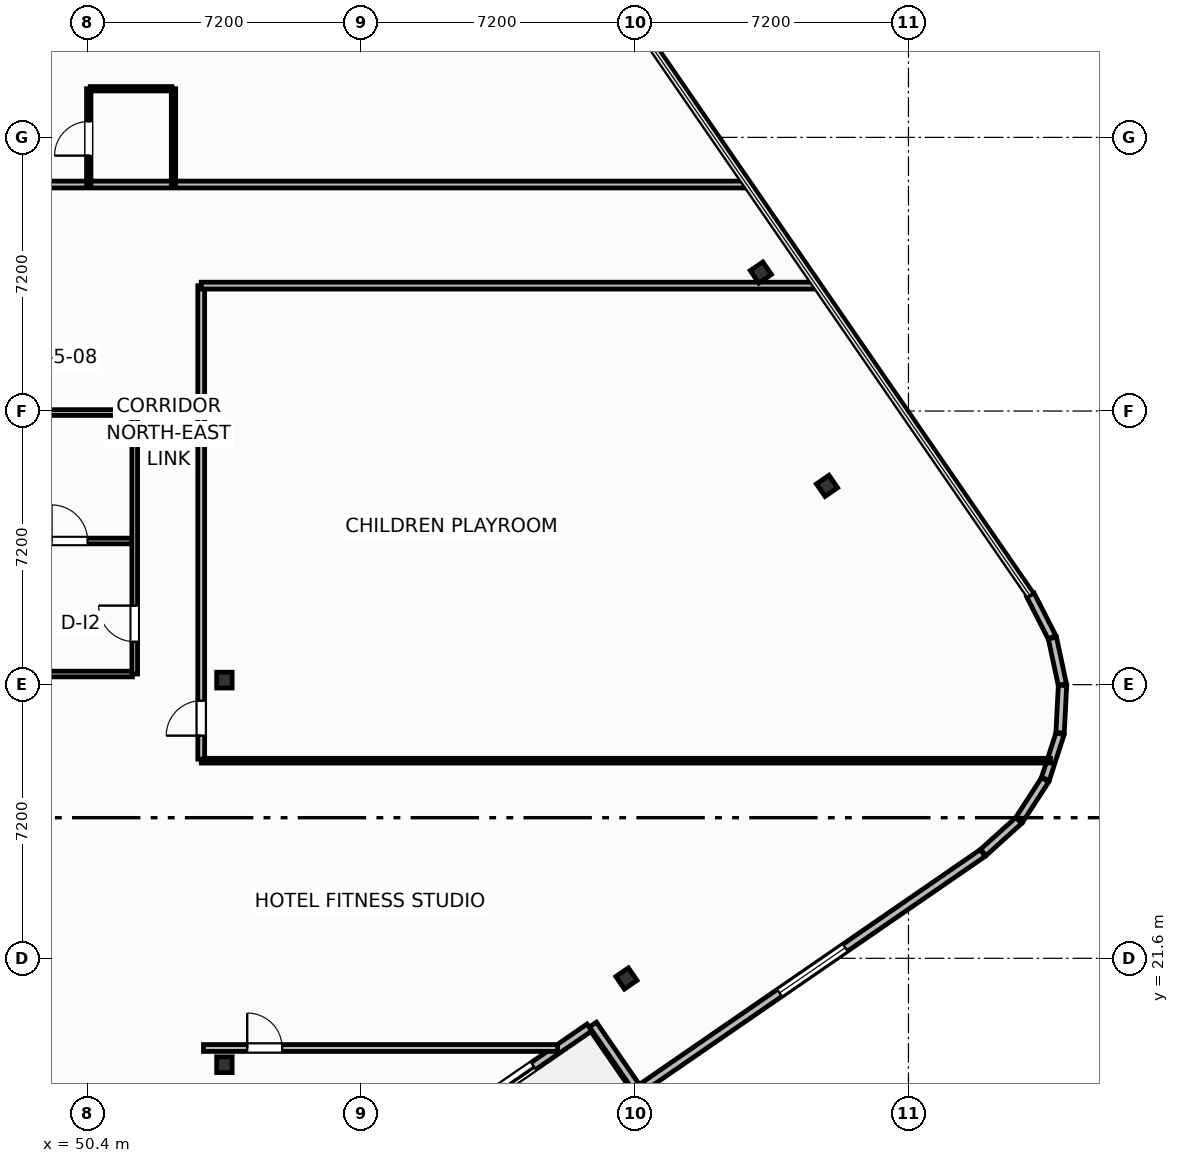
"""IFC4 building model, lengths in metres.
Left out: names, types, materials, properties, quantities, classifications, styles, units other than length and angle.
Written with IfcOpenShell. Run it as: python <this file> out.ifc"""

import sys

from ifc_helpers import new_model, si_unit, direction, frame, frame_2d, origin, origin_2d, place, context, subcontext, project, spatial, rectangle, i_section, extrude, element, fill, save


model = new_model("IFC4")
c1 = context("Model", 3, precision=1e-05, world=origin(), true_north=direction((0.0, 1.0)))
c2 = subcontext(c1, "Body", "Model", "MODEL_VIEW")
j1 = project(units=[si_unit("LENGTHUNIT", "METRE"), si_unit("PLANEANGLEUNIT", "RADIAN")], contexts=[c1])
p1 = place(None, origin())
s1 = spatial("IfcSite", under=j1, at=p1, CompositionType="ELEMENT")
p2 = place(p1, origin())
s2 = spatial("IfcBuilding", under=s1, at=p2, CompositionType="ELEMENT")
p3 = place(p2, frame((0.0, 0.0, 269.3)))
s3 = spatial("IfcBuildingStorey", under=s2, at=p3, CompositionType="ELEMENT", Elevation=269.3)
for number, where, z_axis, x_axis in (
    (1, (54.0, 18.8, 0.0), (0.0, 0.0, 1.0), (1.0, 0.0, 0.0)),
    (2, (54.0, 28.92, 0.0), (0.0, 0.0, 1.0), (1.0, 0.0, 0.0)),
):
    element("IfcColumn", number, at=place(p3, frame(where, z_axis=z_axis, x_axis=x_axis)), inside=s3, PredefinedType="COLUMN", context=c2, shape_type="SweptSolid", body=[
        extrude(i_section(OverallWidth=0.406, OverallDepth=0.416, WebThickness=0.03, FlangeThickness=0.048, FilletRadius=0.025, at=origin_2d()), origin(), (0.0, 0.0, 1.0), 3.7),
    ])
for number, where, z_axis, x_axis in (
    (3, (64.578, 21.07, 0.0), (0.0, 0.0, 1.0), (0.824, 0.567, 0.0)),
    (4, (69.857, 34.031, 0.0), (0.0, 0.0, 1.0), (0.824, 0.567, 0.0)),
    (5, (68.115, 39.644, 0.0), (0.0, 0.0, 1.0), (0.824, 0.567, 0.0)),
):
    element("IfcColumn", number, at=place(p3, frame(where, z_axis=z_axis, x_axis=x_axis)), inside=s3, PredefinedType="COLUMN", context=c2, shape_type="SweptSolid", body=[
        extrude(i_section(OverallWidth=0.401, OverallDepth=0.399, WebThickness=0.025, FlangeThickness=0.04, FilletRadius=0.022, at=origin_2d()), origin(), (0.0, 0.0, 1.0), 3.7),
    ])
p4 = place(p3, frame((63.605, 19.78, 0.0), z_axis=(0.0, 0.0, 1.0), x_axis=(-0.823541290762, -0.567256328665, 0.0)))
e6 = element("IfcWall", 6, at=p4, inside=s3, PredefinedType="SOLIDWALL", context=c2, shape_type="SweptSolid", body=[
    extrude(rectangle(XDim=5.567, YDim=0.22, at=frame_2d((2.784, 0.0))), origin(), (0.0, 0.0, 1.0), 2.73),
])
p5 = place(p4, frame((1.787, 0.0, 0.0)))
e7 = element("IfcOpeningElement", 7, at=p5, cuts=e6, PredefinedType="OPENING", context=c2, shape_type="SweptSolid", body=[
    extrude(rectangle(XDim=2.1, YDim=2.3, at=frame_2d((1.05, 1.15))), frame((0.0, 0.12, 0.0), z_axis=(0.0, -1.0, 0.0), x_axis=(1.0, 0.0, 0.0)), (0.0, 0.0, 1.0), 0.24),
])
p6 = place(p3, frame((63.698, 19.856, 0.0), z_axis=(0.0, 0.0, 1.0), x_axis=(0.567219383419, -0.823566737474, 0.0)))
e8 = element("IfcWall", 8, at=p6, inside=s3, PredefinedType="SOLIDWALL", context=c2, shape_type="SweptSolid", body=[
    extrude(rectangle(XDim=2.1, YDim=0.22, at=frame_2d((1.05, 0.0))), origin(), (0.0, 0.0, 1.0), 2.73),
])
p7 = place(p3, frame((64.992, 18.198, 0.0), z_axis=(0.0, 0.0, 1.0), x_axis=(0.823538117322, 0.56726093583, 0.0)))
e9 = element("IfcWall", 9, at=p7, inside=s3, PredefinedType="SOLIDWALL", context=c2, shape_type="SweptSolid", body=[
    extrude(rectangle(XDim=10.88, YDim=0.22, at=frame_2d((5.44, 0.0))), origin(), (0.0, 0.0, 1.0), 2.73),
])
p8 = place(p7, frame((4.39, 0.0, 0.8)))
e10 = element("IfcOpeningElement", 10, at=p8, cuts=e9, PredefinedType="OPENING", context=c2, shape_type="SweptSolid", body=[
    extrude(rectangle(XDim=2.1, YDim=1.75, at=frame_2d((1.05, 0.875))), frame((0.0, 0.12, 0.0), z_axis=(0.0, -1.0, 0.0), x_axis=(1.0, 0.0, 0.0)), (0.0, 0.0, 1.0), 0.24),
])
p9 = place(p3, frame((73.971, 24.387, 0.0), z_axis=(0.0, 0.0, 1.0), x_axis=(0.742501517089, 0.669844382764, 0.0)))
e11 = element("IfcWall", 11, at=p9, inside=s3, PredefinedType="SOLIDWALL", context=c2, shape_type="SweptSolid", body=[
    extrude(rectangle(XDim=1.257, YDim=0.22, at=frame_2d((0.628, 0.0))), origin(), (0.0, 0.0, 1.0), 2.73),
])
p10 = place(p3, frame((74.917, 25.25, 0.0), z_axis=(0.0, 0.0, 1.0), x_axis=(0.543778157277, 0.839229000731, 0.0)))
e12 = element("IfcWall", 12, at=p10, inside=s3, PredefinedType="SOLIDWALL", context=c2, shape_type="SweptSolid", body=[
    extrude(rectangle(XDim=1.249, YDim=0.22, at=frame_2d((0.624, 0.0))), origin(), (0.0, 0.0, 1.0), 2.73),
])
for number, where, z_axis, x_axis in (
    (13, (75.604, 26.321, 0.0), (0.0, 0.0, 1.0), (0.308, 0.951, 0.0)),
    (14, (75.99, 27.534, 0.0), (0.0, 0.0, 1.0), (0.051, 0.999, 0.0)),
    (15, (76.049, 28.805, 0.0), (0.0, 0.0, 1.0), (-0.209, 0.978, 0.0)),
    (16, (75.777, 30.049, 0.0), (0.0, 0.0, 1.0), (-0.455, 0.891, 0.0)),
):
    element("IfcWall", number, at=place(p3, frame(where, z_axis=z_axis, x_axis=x_axis)), inside=s3, PredefinedType="SOLIDWALL", context=c2, shape_type="SweptSolid", body=[
        extrude(rectangle(XDim=1.249, YDim=0.22, at=frame_2d((0.625, 0.0))), origin(), (0.0, 0.0, 1.0), 2.73),
    ])
p11 = place(p3, frame((46.08, 41.96, 0.0), z_axis=(0.0, 0.0, 1.0), x_axis=(1.0, 0.0, 0.0)))
e17 = element("IfcWall", 17, at=p11, inside=s3, PredefinedType="PARTITIONING", context=c2, shape_type="SweptSolid", body=[
    extrude(rectangle(XDim=21.627, YDim=0.18, at=frame_2d((10.813, 0.0))), origin(), (0.0, 0.0, 1.0), 3.45),
])
p12 = place(p11, frame((0.921, 0.0, 0.0)))
e18 = element("IfcOpeningElement", 18, at=p12, cuts=e17, PredefinedType="OPENING", context=c2, shape_type="SweptSolid", body=[
    extrude(rectangle(XDim=0.95, YDim=2.15, at=frame_2d((0.475, 1.075))), frame((0.0, 0.1, 0.0), z_axis=(0.0, -1.0, 0.0), x_axis=(1.0, 0.0, 0.0)), (0.0, 0.0, 1.0), 0.2),
])
p13 = place(p3, frame((50.47, 44.48, 0.0), z_axis=(0.0, 0.0, 1.0), x_axis=(1.0, 0.0, 0.0)))
e19 = element("IfcWall", 19, at=p13, inside=s3, PredefinedType="PARTITIONING", context=c2, shape_type="SweptSolid", body=[
    extrude(rectangle(XDim=2.15, YDim=0.115, at=frame_2d((1.075, 0.0))), origin(), (0.0, 0.0, 1.0), 3.018),
])
p14 = place(p3, frame((50.43, 41.96, 0.0), z_axis=(0.0, 0.0, 1.0), x_axis=(0.0, 1.0, 0.0)))
e20 = element("IfcWall", 20, at=p14, inside=s3, PredefinedType="PARTITIONING", context=c2, shape_type="SweptSolid", body=[
    extrude(rectangle(XDim=2.52, YDim=0.115, at=frame_2d((1.26, 0.0))), origin(), (0.0, 0.0, 1.0), 3.45),
])
p15 = place(p14, frame((0.76, 0.0, 0.0)))
e21 = element("IfcOpeningElement", 21, at=p15, cuts=e20, PredefinedType="OPENING", context=c2, shape_type="SweptSolid", body=[
    extrude(rectangle(XDim=0.9, YDim=2.05, at=frame_2d((0.45, 1.025))), frame((0.0, 0.067, 0.0), z_axis=(0.0, -1.0, 0.0), x_axis=(1.0, 0.0, 0.0)), (0.0, 0.0, 1.0), 0.135),
])
p16 = place(p3, frame((52.66, 41.96, 0.0), z_axis=(0.0, 0.0, 1.0), x_axis=(0.0, 1.0, 0.0)))
e22 = element("IfcWall", 22, at=p16, inside=s3, PredefinedType="PARTITIONING", context=c2, shape_type="SweptSolid", body=[
    extrude(rectangle(XDim=2.52, YDim=0.115, at=frame_2d((1.26, 0.0))), origin(), (0.0, 0.0, 1.0), 3.45),
])
p17 = place(p3, frame((53.45, 19.24, 0.0), z_axis=(0.0, 0.0, 1.0), x_axis=(1.0, 0.0, 0.0)))
e23 = element("IfcWall", 23, at=p17, inside=s3, PredefinedType="PARTITIONING", context=c2, shape_type="SweptSolid", body=[
    extrude(rectangle(XDim=9.318, YDim=0.18, at=frame_2d((4.659, 0.0))), origin(), (0.0, 0.0, 1.0), 2.739),
])
p18 = place(p17, frame((1.15, 0.0, 0.0)))
e24 = element("IfcOpeningElement", 24, at=p18, cuts=e23, PredefinedType="OPENING", context=c2, shape_type="SweptSolid", body=[
    extrude(rectangle(XDim=0.92, YDim=2.05, at=frame_2d((0.46, 1.025))), frame((0.0, 0.1, 0.0), z_axis=(0.0, -1.0, 0.0), x_axis=(1.0, 0.0, 0.0)), (0.0, 0.0, 1.0), 0.2),
])
p19 = place(p3, frame((53.39, 26.8, 0.0), z_axis=(0.0, 0.0, 1.0), x_axis=(1.0, 0.0, 0.0)))
e25 = element("IfcWall", 25, at=p19, inside=s3, PredefinedType="PARTITIONING", context=c2, shape_type="SweptSolid", body=[
    extrude(rectangle(XDim=22.348, YDim=0.125, at=frame_2d((11.174, 0.0))), origin(), (0.0, 0.0, 1.0), 3.45),
])
p20 = place(p3, frame((53.39, 26.84, 0.0), z_axis=(0.0, 0.0, 1.0), x_axis=(0.0, 1.0, 0.0)))
e26 = element("IfcWall", 26, at=p20, inside=s3, PredefinedType="PARTITIONING", context=c2, shape_type="SweptSolid", body=[
    extrude(rectangle(XDim=12.46, YDim=0.18, at=frame_2d((6.23, 0.0))), origin(), (0.0, 0.0, 1.0), 3.45),
])
p21 = place(p20, frame((0.618, 0.0, 0.0)))
e27 = element("IfcOpeningElement", 27, at=p21, cuts=e26, PredefinedType="OPENING", context=c2, shape_type="SweptSolid", body=[
    extrude(rectangle(XDim=0.92, YDim=2.05, at=frame_2d((0.46, 1.025))), frame((0.0, 0.1, 0.0), z_axis=(0.0, -1.0, 0.0), x_axis=(1.0, 0.0, 0.0)), (0.0, 0.0, 1.0), 0.2),
])
p22 = place(p3, frame((53.39, 39.3, 0.0), z_axis=(0.0, 0.0, 1.0), x_axis=(1.0, 0.0, 0.0)))
e28 = element("IfcWall", 28, at=p22, inside=s3, PredefinedType="PARTITIONING", context=c2, shape_type="SweptSolid", body=[
    extrude(rectangle(XDim=16.149, YDim=0.18, at=frame_2d((8.075, 0.0))), origin(), (0.0, 0.0, 1.0), 2.739),
])
p23 = place(p3, frame((48.3, 32.58, 0.0), z_axis=(0.0, 0.0, 1.0), x_axis=(1.0, 0.0, 0.0)))
e29 = element("IfcWall", 29, at=p23, inside=s3, PredefinedType="PARTITIONING", context=c2, shape_type="SweptSolid", body=[
    extrude(rectangle(XDim=3.28, YDim=0.15, at=frame_2d((1.64, 0.0))), origin(), (0.0, 0.0, 1.0), 3.45),
])
p24 = place(p23, frame((1.15, 0.0, 0.0)))
e30 = element("IfcOpeningElement", 30, at=p24, cuts=e29, PredefinedType="OPENING", context=c2, shape_type="SweptSolid", body=[
    extrude(rectangle(XDim=0.95, YDim=2.05, at=frame_2d((0.475, 1.025))), frame((0.0, 0.085, 0.0), z_axis=(0.0, -1.0, 0.0), x_axis=(1.0, 0.0, 0.0)), (0.0, 0.0, 1.0), 0.17),
])
p25 = place(p3, frame((48.3, 29.08, 0.0), z_axis=(0.0, 0.0, 1.0), x_axis=(1.0, 0.0, 0.0)))
e31 = element("IfcWall", 31, at=p25, inside=s3, PredefinedType="PARTITIONING", context=c2, shape_type="SweptSolid", body=[
    extrude(rectangle(XDim=3.28, YDim=0.15, at=frame_2d((1.64, 0.0))), origin(), (0.0, 0.0, 1.0), 2.662),
])
p26 = place(p3, frame((48.3, 35.96, 0.0), z_axis=(0.0, 0.0, 1.0), x_axis=(1.0, 0.0, 0.0)))
e32 = element("IfcWall", 32, at=p26, inside=s3, PredefinedType="PARTITIONING", context=c2, shape_type="SweptSolid", body=[
    extrude(rectangle(XDim=3.28, YDim=0.15, at=frame_2d((1.64, 0.0))), origin(), (0.0, 0.0, 1.0), 3.45),
])
p27 = place(p3, frame((51.64, 29.08, 0.0), z_axis=(0.0, 0.0, 1.0), x_axis=(0.0, 1.0, 0.0)))
e33 = element("IfcWall", 33, at=p27, inside=s3, PredefinedType="PARTITIONING", context=c2, shape_type="SweptSolid", body=[
    extrude(rectangle(XDim=6.88, YDim=0.15, at=frame_2d((3.44, 0.0))), origin(), (0.0, 0.0, 1.0), 3.45),
])
p28 = place(p27, frame((0.85, 0.0, 0.0)))
e34 = element("IfcOpeningElement", 34, at=p28, cuts=e33, PredefinedType="OPENING", context=c2, shape_type="SweptSolid", body=[
    extrude(rectangle(XDim=0.95, YDim=2.05, at=frame_2d((0.475, 1.025))), frame((0.0, 0.085, 0.0), z_axis=(0.0, -1.0, 0.0), x_axis=(1.0, 0.0, 0.0)), (0.0, 0.0, 1.0), 0.17),
])
p29 = place(p5, origin())
e35 = element("IfcDoor", 35, at=p29, inside=s3, OperationType="SLIDING_TO_LEFT", PredefinedType="DOOR", context=c2, shape_type="SweptSolid", body=[
    extrude(rectangle(XDim=2.1, YDim=2.3, at=frame_2d((1.05, 1.15))), frame((0.0, 0.025, 0.0), z_axis=(0.0, -1.0, 0.0), x_axis=(1.0, 0.0, 0.0)), (0.0, 0.0, 1.0), 0.05),
])
fill(e7, e35)
p30 = place(p8, origin())
e36 = element("IfcWindow", 36, at=p30, inside=s3, PartitioningType="SINGLE_PANEL", PredefinedType="WINDOW", context=c2, shape_type="SweptSolid", body=[
    extrude(rectangle(XDim=2.1, YDim=1.75, at=frame_2d((1.05, 0.875))), frame((0.0, 0.03, 0.0), z_axis=(0.0, -1.0, 0.0), x_axis=(1.0, 0.0, 0.0)), (0.0, 0.0, 1.0), 0.06),
])
fill(e10, e36)
p31 = place(p15, origin())
e37 = element("IfcDoor", 37, at=p31, inside=s3, OperationType="SINGLE_SWING_LEFT", PredefinedType="DOOR", context=c2, shape_type="SweptSolid", body=[
    extrude(rectangle(XDim=0.9, YDim=2.05, at=frame_2d((0.45, 1.025))), frame((0.0, 0.025, 0.0), z_axis=(0.0, -1.0, 0.0), x_axis=(1.0, 0.0, 0.0)), (0.0, 0.0, 1.0), 0.05),
])
fill(e21, e37)
p32 = place(p18, origin())
e38 = element("IfcDoor", 38, at=p32, inside=s3, OperationType="SINGLE_SWING_LEFT", PredefinedType="DOOR", context=c2, shape_type="SweptSolid", body=[
    extrude(rectangle(XDim=0.92, YDim=2.05, at=frame_2d((0.46, 1.025))), frame((0.0, 0.025, 0.0), z_axis=(0.0, -1.0, 0.0), x_axis=(1.0, 0.0, 0.0)), (0.0, 0.0, 1.0), 0.05),
])
fill(e24, e38)
p33 = place(p21, origin())
e39 = element("IfcDoor", 39, at=p33, inside=s3, OperationType="SINGLE_SWING_LEFT", PredefinedType="DOOR", context=c2, shape_type="SweptSolid", body=[
    extrude(rectangle(XDim=0.92, YDim=2.05, at=frame_2d((0.46, 1.025))), frame((0.0, 0.025, 0.0), z_axis=(0.0, -1.0, 0.0), x_axis=(1.0, 0.0, 0.0)), (0.0, 0.0, 1.0), 0.05),
])
fill(e27, e39)
p34 = place(p24, origin())
e40 = element("IfcDoor", 40, at=p34, inside=s3, OperationType="SINGLE_SWING_LEFT", PredefinedType="DOOR", context=c2, shape_type="SweptSolid", body=[
    extrude(rectangle(XDim=0.95, YDim=2.05, at=frame_2d((0.475, 1.025))), frame((0.0, 0.025, 0.0), z_axis=(0.0, -1.0, 0.0), x_axis=(1.0, 0.0, 0.0)), (0.0, 0.0, 1.0), 0.05),
])
fill(e30, e40)
p35 = place(p28, origin())
e41 = element("IfcDoor", 41, at=p35, inside=s3, OperationType="SINGLE_SWING_RIGHT", PredefinedType="DOOR", context=c2, shape_type="SweptSolid", body=[
    extrude(rectangle(XDim=0.95, YDim=2.05, at=frame_2d((0.475, 1.025))), frame((0.0, 0.025, 0.0), z_axis=(0.0, -1.0, 0.0), x_axis=(1.0, 0.0, 0.0)), (0.0, 0.0, 1.0), 0.05),
])
fill(e34, e41)
save(model, sys.argv[1])
